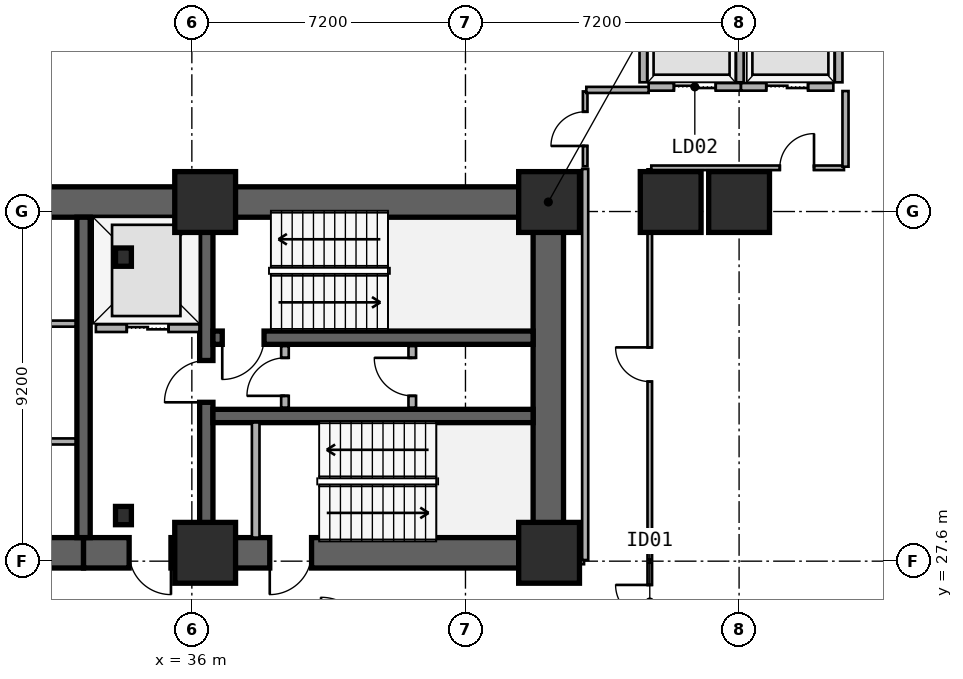
"""IFC4 building model, lengths in metres.
Left out: names, types, materials, properties, quantities, classifications, styles, units other than length and angle.
Written with IfcOpenShell. Run it as: python <this file> out.ifc"""

import sys

from ifc_helpers import new_model, si_unit, direction, frame, frame_2d, origin, origin_2d, place, context, subcontext, project, spatial, rectangle, i_section, extrude, element, fill, save


model = new_model("IFC4")
c1 = context("Model", 3, precision=1e-05, world=origin(), true_north=direction((0.0, 1.0)))
c2 = subcontext(c1, "Body", "Model", "MODEL_VIEW")
j1 = project(units=[si_unit("LENGTHUNIT", "METRE"), si_unit("PLANEANGLEUNIT", "RADIAN")], contexts=[c1])
p1 = place(None, origin())
s1 = spatial("IfcSite", under=j1, at=p1, CompositionType="ELEMENT")
p2 = place(p1, origin())
s2 = spatial("IfcBuilding", under=s1, at=p2, CompositionType="ELEMENT")
p3 = place(p2, frame((0.0, 0.0, -13.2)))
s3 = spatial("IfcBuildingStorey", under=s2, at=p3, CompositionType="ELEMENT", Elevation=-13.2)
p4 = place(p3, frame((12.15, 37.05, 0.0), z_axis=(0.0, 0.0, 1.0), x_axis=(1.0, 0.0, 0.0)))
e1 = element("IfcWall", 1, at=p4, inside=s3, PredefinedType="SHEAR", context=c2, shape_type="SweptSolid", body=[
    extrude(rectangle(XDim=33.23, YDim=0.8, at=frame_2d((16.615, 0.0))), origin(), (0.0, 0.0, 1.0), 4.4),
])
p5 = place(p3, frame((33.15, 27.82, 0.0), z_axis=(0.0, 0.0, 1.0), x_axis=(-1.0, 0.0, 0.0)))
e2 = element("IfcWall", 2, at=p5, inside=s3, PredefinedType="SHEAR", context=c2, shape_type="SweptSolid", body=[
    extrude(rectangle(XDim=11.97, YDim=0.8, at=frame_2d((5.985, 0.0))), origin(), (0.0, 0.0, 1.0), 4.4),
])
p6 = place(p5, frame((6.1, 0.0, 0.0)))
e3 = element("IfcOpeningElement", 3, at=p6, cuts=e2, PredefinedType="OPENING", context=c2, shape_type="SweptSolid", body=[
    extrude(rectangle(XDim=1.6, YDim=2.2, at=frame_2d((0.8, 1.1))), frame((0.0, 0.41, 0.0), z_axis=(0.0, -1.0, 0.0), x_axis=(1.0, 0.0, 0.0)), (0.0, 0.0, 1.0), 0.82),
])
p7 = place(p3, frame((45.38, 27.82, 0.0), z_axis=(0.0, 0.0, 1.0), x_axis=(-1.0, 0.0, 0.0)))
e4 = element("IfcWall", 4, at=p7, inside=s3, PredefinedType="SHEAR", context=c2, shape_type="SweptSolid", body=[
    extrude(rectangle(XDim=12.23, YDim=0.8, at=frame_2d((6.115, 0.0))), origin(), (0.0, 0.0, 1.0), 4.4),
])
p8 = place(p7, frame((9.93, 0.0, 0.0)))
e5 = element("IfcOpeningElement", 5, at=p8, cuts=e4, PredefinedType="OPENING", context=c2, shape_type="SweptSolid", body=[
    extrude(rectangle(XDim=1.1, YDim=2.15, at=frame_2d((0.55, 1.075))), frame((0.0, 0.41, 0.0), z_axis=(0.0, -1.0, 0.0), x_axis=(1.0, 0.0, 0.0)), (0.0, 0.0, 1.0), 0.82),
])
p9 = place(p7, frame((6.23, 0.0, 0.0)))
e6 = element("IfcOpeningElement", 6, at=p9, cuts=e4, PredefinedType="OPENING", context=c2, shape_type="SweptSolid", body=[
    extrude(rectangle(XDim=1.1, YDim=2.15, at=frame_2d((0.55, 1.075))), frame((0.0, 0.41, 0.0), z_axis=(0.0, -1.0, 0.0), x_axis=(1.0, 0.0, 0.0)), (0.0, 0.0, 1.0), 0.82),
])
p10 = place(p3, frame((45.38, 28.22, 0.0), z_axis=(0.0, 0.0, 1.0), x_axis=(0.0, 1.0, 0.0)))
e7 = element("IfcWall", 7, at=p10, inside=s3, PredefinedType="SHEAR", context=c2, shape_type="SweptSolid", body=[
    extrude(rectangle(XDim=8.43, YDim=0.8, at=frame_2d((4.215, 0.0))), origin(), (0.0, 0.0, 1.0), 4.4),
])
p11 = place(p3, frame((33.15, 28.22, 0.0), z_axis=(0.0, 0.0, 1.0), x_axis=(0.0, 1.0, 0.0)))
e8 = element("IfcWall", 8, at=p11, inside=s3, PredefinedType="SHEAR", context=c2, shape_type="SweptSolid", body=[
    extrude(rectangle(XDim=8.43, YDim=0.35, at=frame_2d((4.215, 0.0))), origin(), (0.0, 0.0, 1.0), 4.4),
])
p12 = place(p3, frame((36.38, 28.22, 0.0), z_axis=(0.0, 0.0, 1.0), x_axis=(0.0, 1.0, 0.0)))
e9 = element("IfcWall", 9, at=p12, inside=s3, PredefinedType="SHEAR", context=c2, shape_type="SweptSolid", body=[
    extrude(rectangle(XDim=8.43, YDim=0.35, at=frame_2d((4.215, 0.0))), origin(), (0.0, 0.0, 1.0), 4.4),
])
p13 = place(p12, frame((3.56, 0.0, 0.0)))
e10 = element("IfcOpeningElement", 10, at=p13, cuts=e9, PredefinedType="OPENING", context=c2, shape_type="SweptSolid", body=[
    extrude(rectangle(XDim=1.1, YDim=2.15, at=frame_2d((0.55, 1.075))), frame((0.0, 0.185, 0.0), z_axis=(0.0, -1.0, 0.0), x_axis=(1.0, 0.0, 0.0)), (0.0, 0.0, 1.0), 0.37),
])
p14 = place(p3, frame((44.98, 33.48, 0.0), z_axis=(0.0, 0.0, 1.0), x_axis=(-1.0, 0.0, 0.0)))
e11 = element("IfcWall", 11, at=p14, inside=s3, PredefinedType="SHEAR", context=c2, shape_type="SweptSolid", body=[
    extrude(rectangle(XDim=8.425, YDim=0.35, at=frame_2d((4.212, 0.0))), origin(), (0.0, 0.0, 1.0), 4.4),
])
p15 = place(p14, frame((7.08, 0.0, 0.0)))
e12 = element("IfcOpeningElement", 12, at=p15, cuts=e11, PredefinedType="OPENING", context=c2, shape_type="SweptSolid", body=[
    extrude(rectangle(XDim=1.1, YDim=2.15, at=frame_2d((0.55, 1.075))), frame((0.0, 0.185, 0.0), z_axis=(0.0, -1.0, 0.0), x_axis=(1.0, 0.0, 0.0)), (0.0, 0.0, 1.0), 0.37),
])
p16 = place(p3, frame((36.555, 31.42, 0.0), z_axis=(0.0, 0.0, 1.0), x_axis=(1.0, 0.0, 0.0)))
e13 = element("IfcWall", 13, at=p16, inside=s3, PredefinedType="SHEAR", context=c2, shape_type="SweptSolid", body=[
    extrude(rectangle(XDim=8.425, YDim=0.35, at=frame_2d((4.212, 0.0))), origin(), (0.0, 0.0, 1.0), 4.4),
])
for number, where, z_axis, x_axis in (
    (14, (34.2, 28.8, 0.0), (0.0, 0.0, 1.0), (1.0, 0.0, 0.0)),
    (15, (34.2, 35.6, 0.0), (0.0, 0.0, 1.0), (1.0, 0.0, 0.0)),
):
    element("IfcColumn", number, at=place(p3, frame(where, z_axis=z_axis, x_axis=x_axis)), inside=s3, PredefinedType="COLUMN", context=c2, shape_type="SweptSolid", body=[
        extrude(i_section(OverallWidth=0.418, OverallDepth=0.481, WebThickness=0.043, FlangeThickness=0.068, FilletRadius=0.015, at=origin_2d()), origin(), (0.0, 0.0, 1.0), 4.4),
    ])
for number, where, z_axis, x_axis in (
    (16, (36.35, 27.82, 0.0), (0.0, 0.0, 1.0), (1.0, 0.0, 0.0)),
    (17, (36.35, 37.05, 0.0), (0.0, 0.0, 1.0), (1.0, 0.0, 0.0)),
    (18, (45.4, 27.82, 0.0), (0.0, 0.0, 1.0), (1.0, 0.0, 0.0)),
    (19, (45.4, 37.05, 0.0), (0.0, 0.0, 1.0), (1.0, 0.0, 0.0)),
    (20, (48.6, 37.05, 0.0), (0.0, 0.0, 1.0), (1.0, 0.0, 0.0)),
    (21, (50.4, 37.05, 0.0), (0.0, 0.0, 1.0), (1.0, 0.0, 0.0)),
):
    element("IfcColumn", number, at=place(p3, frame(where, z_axis=z_axis, x_axis=x_axis)), inside=s3, PredefinedType="COLUMN", context=c2, shape_type="SweptSolid", body=[
        extrude(rectangle(XDim=1.6, YDim=1.6, at=origin_2d()), origin(), (0.0, 0.0, 1.0), 4.4),
    ])
p17 = place(p3, frame((33.475, 33.73, 0.0), z_axis=(0.0, 0.0, 1.0), x_axis=(1.0, 0.0, 0.0)))
e22 = element("IfcWall", 22, at=p17, inside=s3, PredefinedType="PARTITIONING", context=c2, shape_type="SweptSolid", body=[
    extrude(rectangle(XDim=2.725, YDim=0.2, at=frame_2d((1.362, 0.0))), origin(), (0.0, 0.0, 1.0), 3.052),
])
p18 = place(p17, frame((0.812, 0.0, 0.0)))
e23 = element("IfcOpeningElement", 23, at=p18, cuts=e22, PredefinedType="OPENING", context=c2, shape_type="SweptSolid", body=[
    extrude(rectangle(XDim=1.1, YDim=2.15, at=frame_2d((0.55, 1.075))), frame((0.0, 0.11, 0.0), z_axis=(0.0, -1.0, 0.0), x_axis=(1.0, 0.0, 0.0)), (0.0, 0.0, 1.0), 0.22),
])
p19 = place(p3, frame((48.02, 40.08, 0.0), z_axis=(0.0, 0.0, 1.0), x_axis=(1.0, 0.0, 0.0)))
e24 = element("IfcWall", 24, at=p19, inside=s3, PredefinedType="PARTITIONING", context=c2, shape_type="SweptSolid", body=[
    extrude(rectangle(XDim=2.43, YDim=0.2, at=frame_2d((1.215, 0.0))), origin(), (0.0, 0.0, 1.0), 4.08),
])
p20 = place(p19, frame((0.665, 0.0, 0.0)))
e25 = element("IfcOpeningElement", 25, at=p20, cuts=e24, PredefinedType="OPENING", context=c2, shape_type="SweptSolid", body=[
    extrude(rectangle(XDim=1.1, YDim=2.15, at=frame_2d((0.55, 1.075))), frame((0.0, 0.11, 0.0), z_axis=(0.0, -1.0, 0.0), x_axis=(1.0, 0.0, 0.0)), (0.0, 0.0, 1.0), 0.22),
])
for number, where, z_axis, x_axis in (
    (26, (47.88, 40.2, 0.0), (0.0, 0.0, 1.0), (0.0, 1.0, 0.0)),
    (27, (50.42, 40.2, 0.0), (0.0, 0.0, 1.0), (0.0, 1.0, 0.0)),
):
    element("IfcWall", number, at=place(p3, frame(where, z_axis=z_axis, x_axis=x_axis)), inside=s3, PredefinedType="PARTITIONING", context=c2, shape_type="SweptSolid", body=[
        extrude(rectangle(XDim=2.6, YDim=0.2, at=frame_2d((1.3, 0.0))), origin(), (0.0, 0.0, 1.0), 4.08),
    ])
p21 = place(p3, frame((50.45, 40.08, 0.0), z_axis=(0.0, 0.0, 1.0), x_axis=(1.0, 0.0, 0.0)))
e28 = element("IfcWall", 28, at=p21, inside=s3, PredefinedType="PARTITIONING", context=c2, shape_type="SweptSolid", body=[
    extrude(rectangle(XDim=2.43, YDim=0.2, at=frame_2d((1.215, 0.0))), origin(), (0.0, 0.0, 1.0), 4.08),
])
p22 = place(p21, frame((0.665, 0.0, 0.0)))
e29 = element("IfcOpeningElement", 29, at=p22, cuts=e28, PredefinedType="OPENING", context=c2, shape_type="SweptSolid", body=[
    extrude(rectangle(XDim=1.1, YDim=2.15, at=frame_2d((0.55, 1.075))), frame((0.0, 0.11, 0.0), z_axis=(0.0, -1.0, 0.0), x_axis=(1.0, 0.0, 0.0)), (0.0, 0.0, 1.0), 0.22),
])
p23 = place(p3, frame((53.02, 40.2, 0.0), z_axis=(0.0, 0.0, 1.0), x_axis=(0.0, 1.0, 0.0)))
e30 = element("IfcWall", 30, at=p23, inside=s3, PredefinedType="PARTITIONING", context=c2, shape_type="SweptSolid", body=[
    extrude(rectangle(XDim=2.6, YDim=0.2, at=frame_2d((1.3, 0.0))), origin(), (0.0, 0.0, 1.0), 4.08),
])
p24 = place(p3, frame((37.68, 28.22, 0.0), z_axis=(0.0, 0.0, 1.0), x_axis=(0.0, 1.0, 0.0)))
e31 = element("IfcWall", 31, at=p24, inside=s3, PredefinedType="PARTITIONING", context=c2, shape_type="SweptSolid", body=[
    extrude(rectangle(XDim=3.03, YDim=0.2, at=frame_2d((1.515, 0.0))), origin(), (0.0, 0.0, 1.0), 4.08),
])
p25 = place(p3, frame((38.45, 31.64, 0.0), z_axis=(0.0, 0.0, 1.0), x_axis=(0.0, 1.0, 0.0)))
e32 = element("IfcWall", 32, at=p25, inside=s3, PredefinedType="PARTITIONING", context=c2, shape_type="SweptSolid", body=[
    extrude(rectangle(XDim=1.62, YDim=0.2, at=frame_2d((0.81, 0.0))), origin(), (0.0, 0.0, 1.0), 4.08),
])
p26 = place(p25, frame((0.31, 0.0, 0.0)))
e33 = element("IfcOpeningElement", 33, at=p26, cuts=e32, PredefinedType="OPENING", context=c2, shape_type="SweptSolid", body=[
    extrude(rectangle(XDim=1.0, YDim=2.15, at=frame_2d((0.5, 1.075))), frame((0.0, 0.11, 0.0), z_axis=(0.0, -1.0, 0.0), x_axis=(1.0, 0.0, 0.0)), (0.0, 0.0, 1.0), 0.22),
])
p27 = place(p3, frame((41.8, 31.64, 0.0), z_axis=(0.0, 0.0, 1.0), x_axis=(0.0, 1.0, 0.0)))
e34 = element("IfcWall", 34, at=p27, inside=s3, PredefinedType="PARTITIONING", context=c2, shape_type="SweptSolid", body=[
    extrude(rectangle(XDim=1.62, YDim=0.2, at=frame_2d((0.81, 0.0))), origin(), (0.0, 0.0, 1.0), 4.08),
])
p28 = place(p27, frame((0.31, 0.0, 0.0)))
e35 = element("IfcOpeningElement", 35, at=p28, cuts=e34, PredefinedType="OPENING", context=c2, shape_type="SweptSolid", body=[
    extrude(rectangle(XDim=1.0, YDim=2.15, at=frame_2d((0.5, 1.075))), frame((0.0, 0.11, 0.0), z_axis=(0.0, -1.0, 0.0), x_axis=(1.0, 0.0, 0.0)), (0.0, 0.0, 1.0), 0.22),
])
p29 = place(p3, frame((48.05, 25.49, 0.0), z_axis=(0.0, 0.0, 1.0), x_axis=(0.0, 1.0, 0.0)))
e36 = element("IfcWall", 36, at=p29, inside=s3, PredefinedType="PARTITIONING", context=c2, shape_type="SweptSolid", body=[
    extrude(rectangle(XDim=2.07, YDim=0.12, at=frame_2d((1.035, 0.0))), origin(), (0.0, 0.0, 1.0), 4.08),
])
p30 = place(p29, frame((0.585, 0.0, 0.0)))
e37 = element("IfcOpeningElement", 37, at=p30, cuts=e36, PredefinedType="OPENING", context=c2, shape_type="SweptSolid", body=[
    extrude(rectangle(XDim=0.9, YDim=2.1, at=frame_2d((0.45, 1.05))), frame((0.0, 0.07, 0.0), z_axis=(0.0, -1.0, 0.0), x_axis=(1.0, 0.0, 0.0)), (0.0, 0.0, 1.0), 0.14),
])
p31 = place(p3, frame((48.05, 27.64, 0.0), z_axis=(0.0, 0.0, 1.0), x_axis=(0.0, 1.0, 0.0)))
e38 = element("IfcWall", 38, at=p31, inside=s3, PredefinedType="PARTITIONING", context=c2, shape_type="SweptSolid", body=[
    extrude(rectangle(XDim=10.27, YDim=0.12, at=frame_2d((5.135, 0.0))), origin(), (0.0, 0.0, 1.0), 4.08),
])
p32 = place(p31, frame((4.685, 0.0, 0.0)))
e39 = element("IfcOpeningElement", 39, at=p32, cuts=e38, PredefinedType="OPENING", context=c2, shape_type="SweptSolid", body=[
    extrude(rectangle(XDim=0.9, YDim=2.1, at=frame_2d((0.45, 1.05))), frame((0.0, 0.07, 0.0), z_axis=(0.0, -1.0, 0.0), x_axis=(1.0, 0.0, 0.0)), (0.0, 0.0, 1.0), 0.14),
])
p33 = place(p3, frame((46.35, 37.99, 0.0), z_axis=(0.0, 0.0, 1.0), x_axis=(0.0, 1.0, 0.0)))
e40 = element("IfcWall", 40, at=p33, inside=s3, PredefinedType="PARTITIONING", context=c2, shape_type="SweptSolid", body=[
    extrude(rectangle(XDim=1.97, YDim=0.12, at=frame_2d((0.985, 0.0))), origin(), (0.0, 0.0, 1.0), 4.08),
])
p34 = place(p33, frame((0.535, 0.0, 0.0)))
e41 = element("IfcOpeningElement", 41, at=p34, cuts=e40, PredefinedType="OPENING", context=c2, shape_type="SweptSolid", body=[
    extrude(rectangle(XDim=0.9, YDim=2.1, at=frame_2d((0.45, 1.05))), frame((0.0, 0.07, 0.0), z_axis=(0.0, -1.0, 0.0), x_axis=(1.0, 0.0, 0.0)), (0.0, 0.0, 1.0), 0.14),
])
p35 = place(p3, frame((48.09, 37.95, 0.0), z_axis=(0.0, 0.0, 1.0), x_axis=(1.0, 0.0, 0.0)))
e42 = element("IfcWall", 42, at=p35, inside=s3, PredefinedType="PARTITIONING", context=c2, shape_type="SweptSolid", body=[
    extrude(rectangle(XDim=5.07, YDim=0.12, at=frame_2d((2.535, 0.0))), origin(), (0.0, 0.0, 1.0), 4.08),
])
p36 = place(p35, frame((3.382, 0.0, 0.0)))
e43 = element("IfcOpeningElement", 43, at=p36, cuts=e42, PredefinedType="OPENING", context=c2, shape_type="SweptSolid", body=[
    extrude(rectangle(XDim=0.9, YDim=2.1, at=frame_2d((0.45, 1.05))), frame((0.0, 0.07, 0.0), z_axis=(0.0, -1.0, 0.0), x_axis=(1.0, 0.0, 0.0)), (0.0, 0.0, 1.0), 0.14),
])
for number, where, z_axis, x_axis in (
    (44, (27.63, 30.75, 0.0), (0.0, 0.0, 1.0), (1.0, 0.0, 0.0)),
    (45, (27.63, 33.85, 0.0), (0.0, 0.0, 1.0), (1.0, 0.0, 0.0)),
):
    element("IfcWall", number, at=place(p3, frame(where, z_axis=z_axis, x_axis=x_axis)), inside=s3, PredefinedType="PARTITIONING", context=c2, shape_type="SweptSolid", body=[
        extrude(rectangle(XDim=5.31, YDim=0.16, at=frame_2d((2.655, 0.0))), origin(), (0.0, 0.0, 1.0), 3.052),
    ])
p37 = place(p3, frame((45.41, 27.6, 0.0), z_axis=(0.0, 0.0, 1.0), x_axis=(1.0, 0.0, 0.0)))
e46 = element("IfcWall", 46, at=p37, inside=s3, PredefinedType="PARTITIONING", context=c2, shape_type="SweptSolid", body=[
    extrude(rectangle(XDim=0.91, YDim=0.16, at=frame_2d((0.455, 0.0))), origin(), (0.0, 0.0, 1.0), 3.052),
])
p38 = place(p3, frame((46.38, 40.0, 0.0), z_axis=(0.0, 0.0, 1.0), x_axis=(1.0, 0.0, 0.0)))
e47 = element("IfcWall", 47, at=p38, inside=s3, PredefinedType="PARTITIONING", context=c2, shape_type="SweptSolid", body=[
    extrude(rectangle(XDim=1.64, YDim=0.16, at=frame_2d((0.82, 0.0))), origin(), (0.0, 0.0, 1.0), 4.08),
])
p39 = place(p3, frame((46.35, 27.63, 0.0), z_axis=(0.0, 0.0, 1.0), x_axis=(0.0, 1.0, 0.0)))
e48 = element("IfcWall", 48, at=p39, inside=s3, PredefinedType="PARTITIONING", context=c2, shape_type="SweptSolid", body=[
    extrude(rectangle(XDim=10.29, YDim=0.16, at=frame_2d((5.145, 0.0))), origin(), (0.0, 0.0, 1.0), 4.08),
])
p40 = place(p3, frame((53.2, 37.98, 0.0), z_axis=(0.0, 0.0, 1.0), x_axis=(0.0, 1.0, 0.0)))
e49 = element("IfcWall", 49, at=p40, inside=s3, PredefinedType="PARTITIONING", context=c2, shape_type="SweptSolid", body=[
    extrude(rectangle(XDim=1.99, YDim=0.16, at=frame_2d((0.995, 0.0))), origin(), (0.0, 0.0, 1.0), 4.08),
])
p41 = place(p18, origin())
e50 = element("IfcDoor", 50, at=p41, inside=s3, OperationType="DOUBLE_DOOR_SLIDING", PredefinedType="DOOR", context=c2, shape_type="SweptSolid", body=[
    extrude(rectangle(XDim=1.1, YDim=2.15, at=frame_2d((0.55, 1.075))), frame((0.0, 0.025, 0.0), z_axis=(0.0, -1.0, 0.0), x_axis=(1.0, 0.0, 0.0)), (0.0, 0.0, 1.0), 0.05),
])
fill(e23, e50)
p42 = place(p20, origin())
e51 = element("IfcDoor", 51, at=p42, inside=s3, OperationType="DOUBLE_DOOR_SLIDING", PredefinedType="DOOR", context=c2, shape_type="SweptSolid", body=[
    extrude(rectangle(XDim=1.1, YDim=2.15, at=frame_2d((0.55, 1.075))), frame((0.0, 0.025, 0.0), z_axis=(0.0, -1.0, 0.0), x_axis=(1.0, 0.0, 0.0)), (0.0, 0.0, 1.0), 0.05),
])
fill(e25, e51)
p43 = place(p22, origin())
e52 = element("IfcDoor", 52, at=p43, inside=s3, OperationType="DOUBLE_DOOR_SLIDING", PredefinedType="DOOR", context=c2, shape_type="SweptSolid", body=[
    extrude(rectangle(XDim=1.1, YDim=2.15, at=frame_2d((0.55, 1.075))), frame((0.0, 0.025, 0.0), z_axis=(0.0, -1.0, 0.0), x_axis=(1.0, 0.0, 0.0)), (0.0, 0.0, 1.0), 0.05),
])
fill(e29, e52)
p44 = place(p15, origin())
e53 = element("IfcDoor", 53, at=p44, inside=s3, OperationType="SINGLE_SWING_RIGHT", PredefinedType="DOOR", context=c2, shape_type="SweptSolid", body=[
    extrude(rectangle(XDim=1.1, YDim=2.15, at=frame_2d((0.55, 1.075))), frame((0.0, 0.025, 0.0), z_axis=(0.0, -1.0, 0.0), x_axis=(1.0, 0.0, 0.0)), (0.0, 0.0, 1.0), 0.05),
])
fill(e12, e53)
p45 = place(p13, origin())
e54 = element("IfcDoor", 54, at=p45, inside=s3, OperationType="SINGLE_SWING_LEFT", PredefinedType="DOOR", context=c2, shape_type="SweptSolid", body=[
    extrude(rectangle(XDim=1.1, YDim=2.15, at=frame_2d((0.55, 1.075))), frame((0.0, 0.025, 0.0), z_axis=(0.0, -1.0, 0.0), x_axis=(1.0, 0.0, 0.0)), (0.0, 0.0, 1.0), 0.05),
])
fill(e10, e54)
p46 = place(p8, origin())
e55 = element("IfcDoor", 55, at=p46, inside=s3, OperationType="SINGLE_SWING_LEFT", PredefinedType="DOOR", context=c2, shape_type="SweptSolid", body=[
    extrude(rectangle(XDim=1.1, YDim=2.15, at=frame_2d((0.55, 1.075))), frame((0.0, 0.025, 0.0), z_axis=(0.0, -1.0, 0.0), x_axis=(1.0, 0.0, 0.0)), (0.0, 0.0, 1.0), 0.05),
])
fill(e5, e55)
p47 = place(p9, origin())
e56 = element("IfcDoor", 56, at=p47, inside=s3, OperationType="SINGLE_SWING_RIGHT", PredefinedType="DOOR", context=c2, shape_type="SweptSolid", body=[
    extrude(rectangle(XDim=1.1, YDim=2.15, at=frame_2d((0.55, 1.075))), frame((0.0, 0.025, 0.0), z_axis=(0.0, -1.0, 0.0), x_axis=(1.0, 0.0, 0.0)), (0.0, 0.0, 1.0), 0.05),
])
fill(e6, e56)
p48 = place(p26, origin())
e57 = element("IfcDoor", 57, at=p48, inside=s3, OperationType="SINGLE_SWING_LEFT", PredefinedType="DOOR", context=c2, shape_type="SweptSolid", body=[
    extrude(rectangle(XDim=1.0, YDim=2.15, at=frame_2d((0.5, 1.075))), frame((0.0, 0.025, 0.0), z_axis=(0.0, -1.0, 0.0), x_axis=(1.0, 0.0, 0.0)), (0.0, 0.0, 1.0), 0.05),
])
fill(e33, e57)
p49 = place(p28, origin())
e58 = element("IfcDoor", 58, at=p49, inside=s3, OperationType="SINGLE_SWING_RIGHT", PredefinedType="DOOR", context=c2, shape_type="SweptSolid", body=[
    extrude(rectangle(XDim=1.0, YDim=2.15, at=frame_2d((0.5, 1.075))), frame((0.0, 0.025, 0.0), z_axis=(0.0, -1.0, 0.0), x_axis=(1.0, 0.0, 0.0)), (0.0, 0.0, 1.0), 0.05),
])
fill(e35, e58)
p50 = place(p30, origin())
e59 = element("IfcDoor", 59, at=p50, inside=s3, OperationType="SINGLE_SWING_RIGHT", PredefinedType="DOOR", context=c2, shape_type="SweptSolid", body=[
    extrude(rectangle(XDim=0.9, YDim=2.1, at=frame_2d((0.45, 1.05))), frame((0.0, 0.025, 0.0), z_axis=(0.0, -1.0, 0.0), x_axis=(1.0, 0.0, 0.0)), (0.0, 0.0, 1.0), 0.05),
])
fill(e37, e59)
p51 = place(p32, origin())
e60 = element("IfcDoor", 60, at=p51, inside=s3, OperationType="SINGLE_SWING_RIGHT", PredefinedType="DOOR", context=c2, shape_type="SweptSolid", body=[
    extrude(rectangle(XDim=0.9, YDim=2.1, at=frame_2d((0.45, 1.05))), frame((0.0, 0.025, 0.0), z_axis=(0.0, -1.0, 0.0), x_axis=(1.0, 0.0, 0.0)), (0.0, 0.0, 1.0), 0.05),
])
fill(e39, e60)
p52 = place(p34, origin())
e61 = element("IfcDoor", 61, at=p52, inside=s3, OperationType="SINGLE_SWING_LEFT", PredefinedType="DOOR", context=c2, shape_type="SweptSolid", body=[
    extrude(rectangle(XDim=0.9, YDim=2.1, at=frame_2d((0.45, 1.05))), frame((0.0, 0.025, 0.0), z_axis=(0.0, -1.0, 0.0), x_axis=(1.0, 0.0, 0.0)), (0.0, 0.0, 1.0), 0.05),
])
fill(e41, e61)
p53 = place(p36, origin())
e62 = element("IfcDoor", 62, at=p53, inside=s3, OperationType="SINGLE_SWING_RIGHT", PredefinedType="DOOR", context=c2, shape_type="SweptSolid", body=[
    extrude(rectangle(XDim=0.9, YDim=2.1, at=frame_2d((0.45, 1.05))), frame((0.0, 0.025, 0.0), z_axis=(0.0, -1.0, 0.0), x_axis=(1.0, 0.0, 0.0)), (0.0, 0.0, 1.0), 0.05),
])
fill(e43, e62)
save(model, sys.argv[1])
